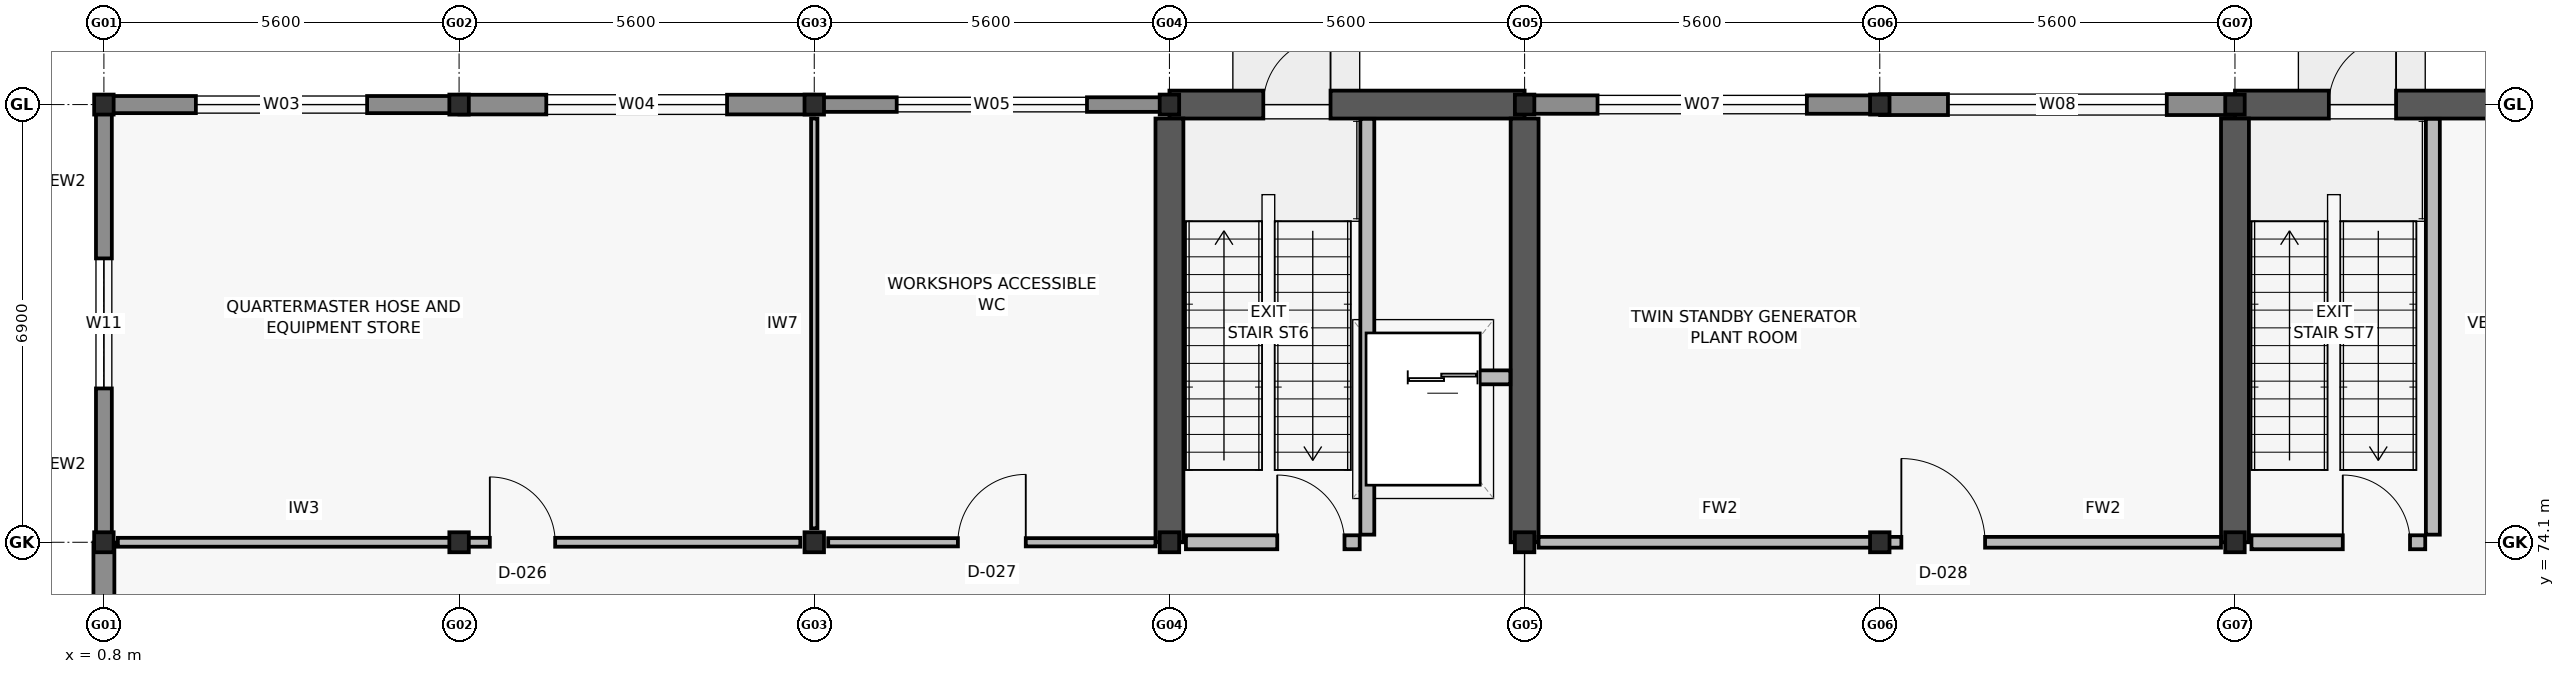
"""IFC4 building model, lengths in metres.
Left out: names, types, materials, properties, quantities, classifications, styles, units other than length and angle.
Written with IfcOpenShell. Run it as: python <this file> out.ifc"""

import sys

from ifc_helpers import new_model, si_unit, direction, frame, frame_2d, origin, origin_2d, place, context, subcontext, project, spatial, rectangle, i_section, extrude, element, fill, save


model = new_model("IFC4")
c1 = context("Model", 3, precision=1e-05, world=origin(), true_north=direction((0.0, 1.0)))
c2 = subcontext(c1, "Body", "Model", "MODEL_VIEW")
j1 = project(units=[si_unit("LENGTHUNIT", "METRE"), si_unit("PLANEANGLEUNIT", "RADIAN")], contexts=[c1])
p1 = place(None, origin())
s1 = spatial("IfcSite", under=j1, at=p1, CompositionType="ELEMENT")
p2 = place(p1, origin())
s2 = spatial("IfcBuilding", under=s1, at=p2, CompositionType="ELEMENT")
p3 = place(p2, origin())
s3 = spatial("IfcBuildingStorey", under=s2, at=p3, CompositionType="ELEMENT", Elevation=0.0)
for number, where, z_axis, x_axis in (
    (1, (0.8, 74.1, 0.0), (0.0, 0.0, 1.0), (1.0, 0.0, 0.0)),
    (2, (0.8, 81.0, 0.0), (0.0, 0.0, 1.0), (1.0, 0.0, 0.0)),
    (3, (6.4, 74.1, 0.0), (0.0, 0.0, 1.0), (1.0, 0.0, 0.0)),
    (4, (6.4, 81.0, 0.0), (0.0, 0.0, 1.0), (1.0, 0.0, 0.0)),
    (5, (12.0, 74.1, 0.0), (0.0, 0.0, 1.0), (1.0, 0.0, 0.0)),
    (6, (12.0, 81.0, 0.0), (0.0, 0.0, 1.0), (1.0, 0.0, 0.0)),
    (7, (17.6, 74.1, 0.0), (0.0, 0.0, 1.0), (1.0, 0.0, 0.0)),
    (8, (17.6, 81.0, 0.0), (0.0, 0.0, 1.0), (1.0, 0.0, 0.0)),
    (9, (23.2, 74.1, 0.0), (0.0, 0.0, 1.0), (1.0, 0.0, 0.0)),
    (10, (23.2, 81.0, 0.0), (0.0, 0.0, 1.0), (1.0, 0.0, 0.0)),
    (11, (28.8, 74.1, 0.0), (0.0, 0.0, 1.0), (1.0, 0.0, 0.0)),
    (12, (28.8, 81.0, 0.0), (0.0, 0.0, 1.0), (1.0, 0.0, 0.0)),
    (13, (34.4, 74.1, 0.0), (0.0, 0.0, 1.0), (1.0, 0.0, 0.0)),
    (14, (34.4, 81.0, 0.0), (0.0, 0.0, 1.0), (1.0, 0.0, 0.0)),
):
    element("IfcColumn", number, at=place(p3, frame(where, z_axis=z_axis, x_axis=x_axis)), inside=s3, PredefinedType="COLUMN", context=c2, shape_type="SweptSolid", body=[
        extrude(i_section(OverallWidth=0.307, OverallDepth=0.315, WebThickness=0.012, FlangeThickness=0.019, FilletRadius=0.017, at=origin_2d()), origin(), (0.0, 0.0, 1.0), 5.4),
    ])
p4 = place(p3, frame((17.6, 81.0, 0.0), z_axis=(0.0, 0.0, 1.0), x_axis=(1.0, 0.0, 0.0)))
e15 = element("IfcWall", 15, at=p4, inside=s3, PredefinedType="SHEAR", context=c2, shape_type="SweptSolid", body=[
    extrude(rectangle(XDim=5.6, YDim=0.44, at=frame_2d((2.8, 0.0))), origin(), (0.0, 0.0, 1.0), 5.16),
])
p5 = place(p4, frame((1.48, 0.0, 0.0)))
e16 = element("IfcOpeningElement", 16, at=p5, cuts=e15, PredefinedType="OPENING", context=c2, shape_type="SweptSolid", body=[
    extrude(rectangle(XDim=1.06, YDim=2.12, at=frame_2d((0.53, 1.06))), frame((0.0, 0.23, 0.0), z_axis=(0.0, -1.0, 0.0), x_axis=(1.0, 0.0, 0.0)), (0.0, 0.0, 1.0), 0.46),
])
for number, where, z_axis, x_axis in (
    (17, (17.6, 74.1, 0.0), (0.0, 0.0, 1.0), (0.0, 1.0, 0.0)),
    (18, (23.2, 74.1, 0.0), (0.0, 0.0, 1.0), (0.0, 1.0, 0.0)),
):
    element("IfcWall", number, at=place(p3, frame(where, z_axis=z_axis, x_axis=x_axis)), inside=s3, PredefinedType="SHEAR", context=c2, shape_type="SweptSolid", body=[
        extrude(rectangle(XDim=6.68, YDim=0.44, at=frame_2d((3.34, 0.0))), origin(), (0.0, 0.0, 1.0), 5.16),
    ])
p6 = place(p3, frame((34.4, 81.0, 0.0), z_axis=(0.0, 0.0, 1.0), x_axis=(1.0, 0.0, 0.0)))
e19 = element("IfcWall", 19, at=p6, inside=s3, PredefinedType="SHEAR", context=c2, shape_type="SweptSolid", body=[
    extrude(rectangle(XDim=5.6, YDim=0.44, at=frame_2d((2.8, 0.0))), origin(), (0.0, 0.0, 1.0), 5.16),
])
p7 = place(p6, frame((1.48, 0.0, 0.0)))
e20 = element("IfcOpeningElement", 20, at=p7, cuts=e19, PredefinedType="OPENING", context=c2, shape_type="SweptSolid", body=[
    extrude(rectangle(XDim=1.06, YDim=2.12, at=frame_2d((0.53, 1.06))), frame((0.0, 0.23, 0.0), z_axis=(0.0, -1.0, 0.0), x_axis=(1.0, 0.0, 0.0)), (0.0, 0.0, 1.0), 0.46),
])
p8 = place(p3, frame((34.4, 74.1, 0.0), z_axis=(0.0, 0.0, 1.0), x_axis=(0.0, 1.0, 0.0)))
e21 = element("IfcWall", 21, at=p8, inside=s3, PredefinedType="SHEAR", context=c2, shape_type="SweptSolid", body=[
    extrude(rectangle(XDim=6.68, YDim=0.44, at=frame_2d((3.34, 0.0))), origin(), (0.0, 0.0, 1.0), 5.16),
])
p9 = place(p3, frame((0.805, 81.0, 0.0), z_axis=(0.0, 0.0, 1.0), x_axis=(1.0, 0.0, 0.0)))
e22 = element("IfcWall", 22, at=p9, inside=s3, PredefinedType="SOLIDWALL", context=c2, shape_type="SweptSolid", body=[
    extrude(rectangle(XDim=5.59, YDim=0.27, at=frame_2d((2.795, 0.0))), origin(), (0.0, 0.0, 1.0), 4.52),
])
p10 = place(p9, frame((1.445, 0.0, 0.8)))
e23 = element("IfcOpeningElement", 23, at=p10, cuts=e22, PredefinedType="OPENING", context=c2, shape_type="SweptSolid", body=[
    extrude(rectangle(XDim=2.7, YDim=2.1, at=frame_2d((1.35, 1.05))), frame((0.0, 0.145, 0.0), z_axis=(0.0, -1.0, 0.0), x_axis=(1.0, 0.0, 0.0)), (0.0, 0.0, 1.0), 0.29),
])
p11 = place(p3, frame((6.405, 81.0, 0.0), z_axis=(0.0, 0.0, 1.0), x_axis=(1.0, 0.0, 0.0)))
e24 = element("IfcWall", 24, at=p11, inside=s3, PredefinedType="SOLIDWALL", context=c2, shape_type="SweptSolid", body=[
    extrude(rectangle(XDim=5.59, YDim=0.31, at=frame_2d((2.795, 0.0))), origin(), (0.0, 0.0, 1.0), 4.52),
])
p12 = place(p11, frame((1.37, 0.0, 0.8)))
e25 = element("IfcOpeningElement", 25, at=p12, cuts=e24, PredefinedType="OPENING", context=c2, shape_type="SweptSolid", body=[
    extrude(rectangle(XDim=2.85, YDim=2.1, at=frame_2d((1.425, 1.05))), frame((0.0, 0.165, 0.0), z_axis=(0.0, -1.0, 0.0), x_axis=(1.0, 0.0, 0.0)), (0.0, 0.0, 1.0), 0.33),
])
p13 = place(p3, frame((12.005, 81.0, 0.0), z_axis=(0.0, 0.0, 1.0), x_axis=(1.0, 0.0, 0.0)))
e26 = element("IfcWall", 26, at=p13, inside=s3, PredefinedType="SOLIDWALL", context=c2, shape_type="SweptSolid", body=[
    extrude(rectangle(XDim=5.59, YDim=0.23, at=frame_2d((2.795, 0.0))), origin(), (0.0, 0.0, 1.0), 4.52),
])
p14 = place(p13, frame((1.295, 0.0, 0.8)))
e27 = element("IfcOpeningElement", 27, at=p14, cuts=e26, PredefinedType="OPENING", context=c2, shape_type="SweptSolid", body=[
    extrude(rectangle(XDim=3.0, YDim=2.1, at=frame_2d((1.5, 1.05))), frame((0.0, 0.125, 0.0), z_axis=(0.0, -1.0, 0.0), x_axis=(1.0, 0.0, 0.0)), (0.0, 0.0, 1.0), 0.25),
])
p15 = place(p3, frame((23.205, 81.0, 0.0), z_axis=(0.0, 0.0, 1.0), x_axis=(1.0, 0.0, 0.0)))
e28 = element("IfcWall", 28, at=p15, inside=s3, PredefinedType="SOLIDWALL", context=c2, shape_type="SweptSolid", body=[
    extrude(rectangle(XDim=5.59, YDim=0.29, at=frame_2d((2.795, 0.0))), origin(), (0.0, 0.0, 1.0), 4.52),
])
p16 = place(p15, frame((1.145, 0.0, 0.8)))
e29 = element("IfcOpeningElement", 29, at=p16, cuts=e28, PredefinedType="OPENING", context=c2, shape_type="SweptSolid", body=[
    extrude(rectangle(XDim=3.3, YDim=2.2, at=frame_2d((1.65, 1.1))), frame((0.0, 0.155, 0.0), z_axis=(0.0, -1.0, 0.0), x_axis=(1.0, 0.0, 0.0)), (0.0, 0.0, 1.0), 0.31),
])
p17 = place(p3, frame((28.805, 81.0, 0.0), z_axis=(0.0, 0.0, 1.0), x_axis=(1.0, 0.0, 0.0)))
e30 = element("IfcWall", 30, at=p17, inside=s3, PredefinedType="SOLIDWALL", context=c2, shape_type="SweptSolid", body=[
    extrude(rectangle(XDim=5.59, YDim=0.33, at=frame_2d((2.795, 0.0))), origin(), (0.0, 0.0, 1.0), 4.52),
])
p18 = place(p17, frame((1.07, 0.0, 0.8)))
e31 = element("IfcOpeningElement", 31, at=p18, cuts=e30, PredefinedType="OPENING", context=c2, shape_type="SweptSolid", body=[
    extrude(rectangle(XDim=3.45, YDim=2.2, at=frame_2d((1.725, 1.1))), frame((0.0, 0.175, 0.0), z_axis=(0.0, -1.0, 0.0), x_axis=(1.0, 0.0, 0.0)), (0.0, 0.0, 1.0), 0.35),
])
p19 = place(p3, frame((0.8, 67.205, 0.0), z_axis=(0.0, 0.0, 1.0), x_axis=(0.0, 1.0, 0.0)))
e32 = element("IfcWall", 32, at=p19, inside=s3, PredefinedType="SOLIDWALL", context=c2, shape_type="SweptSolid", body=[
    extrude(rectangle(XDim=6.89, YDim=0.33, at=frame_2d((3.445, 0.0))), origin(), (0.0, 0.0, 1.0), 4.52),
])
p20 = place(p19, frame((1.312, 0.0, 0.8)))
e33 = element("IfcOpeningElement", 33, at=p20, cuts=e32, PredefinedType="OPENING", context=c2, shape_type="SweptSolid", body=[
    extrude(rectangle(XDim=1.9, YDim=1.8, at=frame_2d((0.95, 0.9))), frame((0.0, 0.175, 0.0), z_axis=(0.0, -1.0, 0.0), x_axis=(1.0, 0.0, 0.0)), (0.0, 0.0, 1.0), 0.35),
])
p21 = place(p3, frame((0.8, 74.105, 0.0), z_axis=(0.0, 0.0, 1.0), x_axis=(0.0, 1.0, 0.0)))
e34 = element("IfcWall", 34, at=p21, inside=s3, PredefinedType="SOLIDWALL", context=c2, shape_type="SweptSolid", body=[
    extrude(rectangle(XDim=6.89, YDim=0.25, at=frame_2d((3.445, 0.0))), origin(), (0.0, 0.0, 1.0), 4.52),
])
p22 = place(p21, frame((2.42, 0.0, 0.8)))
e35 = element("IfcOpeningElement", 35, at=p22, cuts=e34, PredefinedType="OPENING", context=c2, shape_type="SweptSolid", body=[
    extrude(rectangle(XDim=2.05, YDim=1.8, at=frame_2d((1.025, 0.9))), frame((0.0, 0.135, 0.0), z_axis=(0.0, -1.0, 0.0), x_axis=(1.0, 0.0, 0.0)), (0.0, 0.0, 1.0), 0.27),
])
p23 = place(p3, frame((20.72, 74.22, 0.0), z_axis=(0.0, 0.0, 1.0), x_axis=(0.0, 1.0, 0.0)))
e36 = element("IfcWall", 36, at=p23, inside=s3, PredefinedType="SOLIDWALL", context=c2, shape_type="SweptSolid", body=[
    extrude(rectangle(XDim=6.555, YDim=0.22, at=frame_2d((3.277, 0.0))), origin(), (0.0, 0.0, 1.0), 5.16),
])
p24 = place(p3, frame((17.86, 74.1, 0.0), z_axis=(0.0, 0.0, 1.0), x_axis=(1.0, 0.0, 0.0)))
e37 = element("IfcWall", 37, at=p24, inside=s3, PredefinedType="SOLIDWALL", context=c2, shape_type="SweptSolid", body=[
    extrude(rectangle(XDim=2.74, YDim=0.22, at=frame_2d((1.37, 0.0))), origin(), (0.0, 0.0, 1.0), 4.52),
])
p25 = place(p24, frame((1.44, 0.0, 0.0)))
e38 = element("IfcOpeningElement", 38, at=p25, cuts=e37, PredefinedType="OPENING", context=c2, shape_type="SweptSolid", body=[
    extrude(rectangle(XDim=1.06, YDim=2.1, at=frame_2d((0.53, 1.05))), frame((0.0, 0.12, 0.0), z_axis=(0.0, -1.0, 0.0), x_axis=(1.0, 0.0, 0.0)), (0.0, 0.0, 1.0), 0.24),
])
p26 = place(p3, frame((20.84, 76.7, 0.0), z_axis=(0.0, 0.0, 1.0), x_axis=(1.0, 0.0, 0.0)))
e39 = element("IfcWall", 39, at=p26, inside=s3, PredefinedType="SOLIDWALL", context=c2, shape_type="SweptSolid", body=[
    extrude(rectangle(XDim=2.135, YDim=0.22, at=frame_2d((1.067, 0.0))), origin(), (0.0, 0.0, 1.0), 5.16),
])
p27 = place(p26, frame((0.518, 0.0, 0.0)))
e40 = element("IfcOpeningElement", 40, at=p27, cuts=e39, PredefinedType="OPENING", context=c2, shape_type="SweptSolid", body=[
    extrude(rectangle(XDim=1.1, YDim=2.1, at=frame_2d((0.55, 1.05))), frame((0.0, 0.12, 0.0), z_axis=(0.0, -1.0, 0.0), x_axis=(1.0, 0.0, 0.0)), (0.0, 0.0, 1.0), 0.24),
])
p28 = place(p3, frame((37.52, 74.22, 0.0), z_axis=(0.0, 0.0, 1.0), x_axis=(0.0, 1.0, 0.0)))
e41 = element("IfcWall", 41, at=p28, inside=s3, PredefinedType="SOLIDWALL", context=c2, shape_type="SweptSolid", body=[
    extrude(rectangle(XDim=6.555, YDim=0.22, at=frame_2d((3.277, 0.0))), origin(), (0.0, 0.0, 1.0), 5.16),
])
p29 = place(p3, frame((34.66, 74.1, 0.0), z_axis=(0.0, 0.0, 1.0), x_axis=(1.0, 0.0, 0.0)))
e42 = element("IfcWall", 42, at=p29, inside=s3, PredefinedType="SOLIDWALL", context=c2, shape_type="SweptSolid", body=[
    extrude(rectangle(XDim=2.74, YDim=0.22, at=frame_2d((1.37, 0.0))), origin(), (0.0, 0.0, 1.0), 4.52),
])
p30 = place(p29, frame((1.44, 0.0, 0.0)))
e43 = element("IfcOpeningElement", 43, at=p30, cuts=e42, PredefinedType="OPENING", context=c2, shape_type="SweptSolid", body=[
    extrude(rectangle(XDim=1.06, YDim=2.1, at=frame_2d((0.53, 1.05))), frame((0.0, 0.12, 0.0), z_axis=(0.0, -1.0, 0.0), x_axis=(1.0, 0.0, 0.0)), (0.0, 0.0, 1.0), 0.24),
])
p31 = place(p3, frame((1.02, 74.1, 0.0), z_axis=(0.0, 0.0, 1.0), x_axis=(1.0, 0.0, 0.0)))
e44 = element("IfcWall", 44, at=p31, inside=s3, PredefinedType="PARTITIONING", context=c2, shape_type="SweptSolid", body=[
    extrude(rectangle(XDim=10.76, YDim=0.14, at=frame_2d((5.38, 0.0))), origin(), (0.0, 0.0, 1.0), 4.5),
])
p32 = place(p31, frame((5.865, 0.0, 0.0)))
e45 = element("IfcOpeningElement", 45, at=p32, cuts=e44, PredefinedType="OPENING", context=c2, shape_type="SweptSolid", body=[
    extrude(rectangle(XDim=1.03, YDim=2.06, at=frame_2d((0.515, 1.03))), frame((0.0, 0.08, 0.0), z_axis=(0.0, -1.0, 0.0), x_axis=(1.0, 0.0, 0.0)), (0.0, 0.0, 1.0), 0.16),
])
p33 = place(p3, frame((12.22, 74.1, 0.0), z_axis=(0.0, 0.0, 1.0), x_axis=(1.0, 0.0, 0.0)))
e46 = element("IfcWall", 46, at=p33, inside=s3, PredefinedType="PARTITIONING", context=c2, shape_type="SweptSolid", body=[
    extrude(rectangle(XDim=5.16, YDim=0.13, at=frame_2d((2.58, 0.0))), origin(), (0.0, 0.0, 1.0), 4.5),
])
p34 = place(p33, frame((2.045, 0.0, 0.0)))
e47 = element("IfcOpeningElement", 47, at=p34, cuts=e46, PredefinedType="OPENING", context=c2, shape_type="SweptSolid", body=[
    extrude(rectangle(XDim=1.07, YDim=2.08, at=frame_2d((0.535, 1.04))), frame((0.0, 0.075, 0.0), z_axis=(0.0, -1.0, 0.0), x_axis=(1.0, 0.0, 0.0)), (0.0, 0.0, 1.0), 0.15),
])
p35 = place(p3, frame((23.42, 74.1, 0.0), z_axis=(0.0, 0.0, 1.0), x_axis=(1.0, 0.0, 0.0)))
e48 = element("IfcWall", 48, at=p35, inside=s3, PredefinedType="PARTITIONING", context=c2, shape_type="SweptSolid", body=[
    extrude(rectangle(XDim=10.76, YDim=0.17, at=frame_2d((5.38, 0.0))), origin(), (0.0, 0.0, 1.0), 4.5),
])
p36 = place(p35, frame((5.72, 0.0, 0.0)))
e49 = element("IfcOpeningElement", 49, at=p36, cuts=e48, PredefinedType="OPENING", context=c2, shape_type="SweptSolid", body=[
    extrude(rectangle(XDim=1.32, YDim=2.12, at=frame_2d((0.66, 1.06))), frame((0.0, 0.095, 0.0), z_axis=(0.0, -1.0, 0.0), x_axis=(1.0, 0.0, 0.0)), (0.0, 0.0, 1.0), 0.19),
])
p37 = place(p3, frame((12.0, 74.32, 0.0), z_axis=(0.0, 0.0, 1.0), x_axis=(0.0, 1.0, 0.0)))
e50 = element("IfcWall", 50, at=p37, inside=s3, PredefinedType="PARTITIONING", context=c2, shape_type="SweptSolid", body=[
    extrude(rectangle(XDim=6.46, YDim=0.1, at=frame_2d((3.23, 0.0))), origin(), (0.0, 0.0, 1.0), 4.5),
])
p38 = place(p10, origin())
e51 = element("IfcWindow", 51, at=p38, inside=s3, PartitioningType="TRIPLE_PANEL_VERTICAL", PredefinedType="WINDOW", context=c2, shape_type="SweptSolid", body=[
    extrude(rectangle(XDim=2.7, YDim=2.1, at=frame_2d((1.35, 1.05))), frame((0.0, 0.03, 0.0), z_axis=(0.0, -1.0, 0.0), x_axis=(1.0, 0.0, 0.0)), (0.0, 0.0, 1.0), 0.06),
])
fill(e23, e51)
p39 = place(p12, origin())
e52 = element("IfcWindow", 52, at=p39, inside=s3, PartitioningType="TRIPLE_PANEL_VERTICAL", PredefinedType="WINDOW", context=c2, shape_type="SweptSolid", body=[
    extrude(rectangle(XDim=2.85, YDim=2.1, at=frame_2d((1.425, 1.05))), frame((0.0, 0.03, 0.0), z_axis=(0.0, -1.0, 0.0), x_axis=(1.0, 0.0, 0.0)), (0.0, 0.0, 1.0), 0.06),
])
fill(e25, e52)
p40 = place(p14, origin())
e53 = element("IfcWindow", 53, at=p40, inside=s3, PartitioningType="TRIPLE_PANEL_VERTICAL", PredefinedType="WINDOW", context=c2, shape_type="SweptSolid", body=[
    extrude(rectangle(XDim=3.0, YDim=2.1, at=frame_2d((1.5, 1.05))), frame((0.0, 0.03, 0.0), z_axis=(0.0, -1.0, 0.0), x_axis=(1.0, 0.0, 0.0)), (0.0, 0.0, 1.0), 0.06),
])
fill(e27, e53)
p41 = place(p16, origin())
e54 = element("IfcWindow", 54, at=p41, inside=s3, PartitioningType="TRIPLE_PANEL_VERTICAL", PredefinedType="WINDOW", context=c2, shape_type="SweptSolid", body=[
    extrude(rectangle(XDim=3.3, YDim=2.2, at=frame_2d((1.65, 1.1))), frame((0.0, 0.03, 0.0), z_axis=(0.0, -1.0, 0.0), x_axis=(1.0, 0.0, 0.0)), (0.0, 0.0, 1.0), 0.06),
])
fill(e29, e54)
p42 = place(p18, origin())
e55 = element("IfcWindow", 55, at=p42, inside=s3, PartitioningType="TRIPLE_PANEL_VERTICAL", PredefinedType="WINDOW", context=c2, shape_type="SweptSolid", body=[
    extrude(rectangle(XDim=3.45, YDim=2.2, at=frame_2d((1.725, 1.1))), frame((0.0, 0.03, 0.0), z_axis=(0.0, -1.0, 0.0), x_axis=(1.0, 0.0, 0.0)), (0.0, 0.0, 1.0), 0.06),
])
fill(e31, e55)
p43 = place(p22, origin())
e56 = element("IfcWindow", 56, at=p43, inside=s3, PartitioningType="DOUBLE_PANEL_VERTICAL", PredefinedType="WINDOW", context=c2, shape_type="SweptSolid", body=[
    extrude(rectangle(XDim=2.05, YDim=1.8, at=frame_2d((1.025, 0.9))), frame((0.0, 0.03, 0.0), z_axis=(0.0, -1.0, 0.0), x_axis=(1.0, 0.0, 0.0)), (0.0, 0.0, 1.0), 0.06),
])
fill(e35, e56)
p44 = place(p25, origin())
e57 = element("IfcDoor", 57, at=p44, inside=s3, OperationType="SINGLE_SWING_LEFT", PredefinedType="DOOR", context=c2, shape_type="SweptSolid", body=[
    extrude(rectangle(XDim=1.06, YDim=2.1, at=frame_2d((0.53, 1.05))), frame((0.0, 0.025, 0.0), z_axis=(0.0, -1.0, 0.0), x_axis=(1.0, 0.0, 0.0)), (0.0, 0.0, 1.0), 0.05),
])
fill(e38, e57)
p45 = place(p5, origin())
e58 = element("IfcDoor", 58, at=p45, inside=s3, OperationType="SINGLE_SWING_RIGHT", PredefinedType="DOOR", context=c2, shape_type="SweptSolid", body=[
    extrude(rectangle(XDim=1.06, YDim=2.12, at=frame_2d((0.53, 1.06))), frame((0.0, 0.025, 0.0), z_axis=(0.0, -1.0, 0.0), x_axis=(1.0, 0.0, 0.0)), (0.0, 0.0, 1.0), 0.05),
])
fill(e16, e58)
p46 = place(p27, origin())
e59 = element("IfcDoor", 59, at=p46, inside=s3, OperationType="DOUBLE_DOOR_SLIDING", PredefinedType="DOOR", context=c2, shape_type="SweptSolid", body=[
    extrude(rectangle(XDim=1.1, YDim=2.1, at=frame_2d((0.55, 1.05))), frame((0.0, 0.025, 0.0), z_axis=(0.0, -1.0, 0.0), x_axis=(1.0, 0.0, 0.0)), (0.0, 0.0, 1.0), 0.05),
])
fill(e40, e59)
p47 = place(p30, origin())
e60 = element("IfcDoor", 60, at=p47, inside=s3, OperationType="SINGLE_SWING_LEFT", PredefinedType="DOOR", context=c2, shape_type="SweptSolid", body=[
    extrude(rectangle(XDim=1.06, YDim=2.1, at=frame_2d((0.53, 1.05))), frame((0.0, 0.025, 0.0), z_axis=(0.0, -1.0, 0.0), x_axis=(1.0, 0.0, 0.0)), (0.0, 0.0, 1.0), 0.05),
])
fill(e43, e60)
p48 = place(p7, origin())
e61 = element("IfcDoor", 61, at=p48, inside=s3, OperationType="SINGLE_SWING_RIGHT", PredefinedType="DOOR", context=c2, shape_type="SweptSolid", body=[
    extrude(rectangle(XDim=1.06, YDim=2.12, at=frame_2d((0.53, 1.06))), frame((0.0, 0.025, 0.0), z_axis=(0.0, -1.0, 0.0), x_axis=(1.0, 0.0, 0.0)), (0.0, 0.0, 1.0), 0.05),
])
fill(e20, e61)
p49 = place(p32, origin())
e62 = element("IfcDoor", 62, at=p49, inside=s3, OperationType="SINGLE_SWING_LEFT", PredefinedType="DOOR", context=c2, shape_type="SweptSolid", body=[
    extrude(rectangle(XDim=1.03, YDim=2.06, at=frame_2d((0.515, 1.03))), frame((0.0, 0.025, 0.0), z_axis=(0.0, -1.0, 0.0), x_axis=(1.0, 0.0, 0.0)), (0.0, 0.0, 1.0), 0.05),
])
fill(e45, e62)
p50 = place(p34, origin())
e63 = element("IfcDoor", 63, at=p50, inside=s3, OperationType="SINGLE_SWING_RIGHT", PredefinedType="DOOR", context=c2, shape_type="SweptSolid", body=[
    extrude(rectangle(XDim=1.07, YDim=2.08, at=frame_2d((0.535, 1.04))), frame((0.0, 0.025, 0.0), z_axis=(0.0, -1.0, 0.0), x_axis=(1.0, 0.0, 0.0)), (0.0, 0.0, 1.0), 0.05),
])
fill(e47, e63)
p51 = place(p36, origin())
e64 = element("IfcDoor", 64, at=p51, inside=s3, OperationType="SINGLE_SWING_LEFT", PredefinedType="DOOR", context=c2, shape_type="SweptSolid", body=[
    extrude(rectangle(XDim=1.32, YDim=2.12, at=frame_2d((0.66, 1.06))), frame((0.0, 0.025, 0.0), z_axis=(0.0, -1.0, 0.0), x_axis=(1.0, 0.0, 0.0)), (0.0, 0.0, 1.0), 0.05),
])
fill(e49, e64)
save(model, sys.argv[1])
